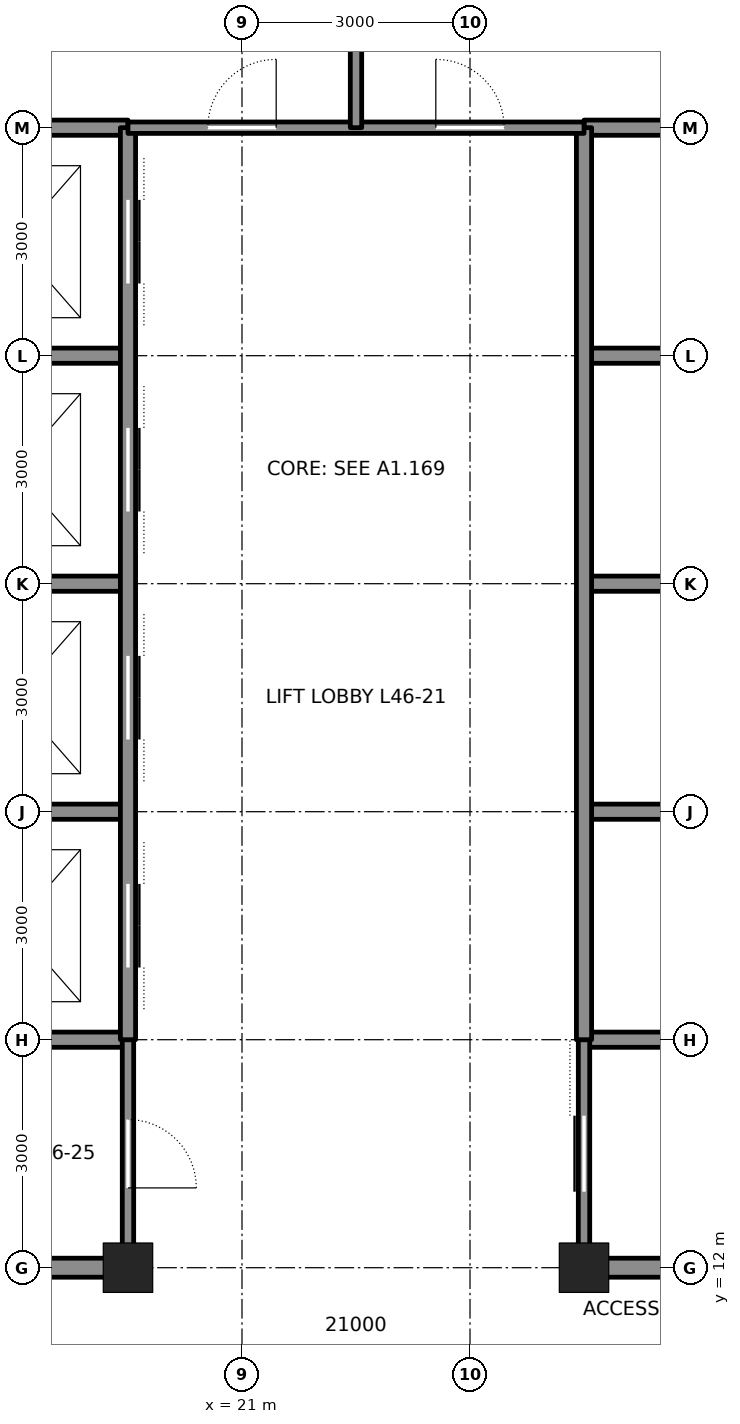
"""IFC4 building model, lengths in metres.
Left out: names, types, materials, properties, quantities, classifications, styles, units other than length and angle.
Written with IfcOpenShell. Run it as: python <this file> out.ifc"""

import sys

from ifc_helpers import new_model, si_unit, direction, frame, frame_2d, origin, origin_2d, place, context, subcontext, project, spatial, rectangle, hollow_rectangle, extrude, element, fill, save


model = new_model("IFC4")
c1 = context("Model", 3, precision=1e-05, world=origin(), true_north=direction((0.0, 1.0)))
c2 = subcontext(c1, "Body", "Model", "MODEL_VIEW")
j1 = project(units=[si_unit("LENGTHUNIT", "METRE"), si_unit("PLANEANGLEUNIT", "RADIAN")], contexts=[c1])
p1 = place(None, origin())
s1 = spatial("IfcSite", under=j1, at=p1, CompositionType="ELEMENT")
p2 = place(p1, origin())
s2 = spatial("IfcBuilding", under=s1, at=p2, CompositionType="ELEMENT")
p3 = place(p2, frame((0.0, 0.0, 209.7)))
s3 = spatial("IfcBuildingStorey", under=s2, at=p3, CompositionType="ELEMENT", Elevation=209.7)
for number, where, z_axis, x_axis in (
    (1, (19.5, 12.0, 0.0), (0.0, 0.0, 1.0), (1.0, 0.0, 0.0)),
    (2, (25.5, 12.0, 0.0), (0.0, 0.0, 1.0), (1.0, 0.0, 0.0)),
):
    element("IfcColumn", number, at=place(p3, frame(where, z_axis=z_axis, x_axis=x_axis)), inside=s3, PredefinedType="COLUMN", context=c2, shape_type="SweptSolid", body=[
        extrude(hollow_rectangle(XDim=0.65, YDim=0.65, WallThickness=0.065, at=origin_2d()), origin(), (0.0, 0.0, 1.0), 4.2),
    ])
for number, where, z_axis, x_axis in (
    (3, (16.75, 12.0, 0.0), (0.0, 0.0, 1.0), (1.0, 0.0, 0.0)),
    (4, (25.75, 12.0, 0.0), (0.0, 0.0, 1.0), (1.0, 0.0, 0.0)),
):
    element("IfcWall", number, at=place(p3, frame(where, z_axis=z_axis, x_axis=x_axis)), inside=s3, PredefinedType="SOLIDWALL", context=c2, shape_type="SweptSolid", body=[
        extrude(rectangle(XDim=2.5, YDim=0.25, at=frame_2d((1.25, 0.0))), origin(), (0.0, 0.0, 1.0), 3.182),
    ])
for number, where, z_axis, x_axis in (
    (5, (12.0, 15.0, 0.0), (0.0, 0.0, 1.0), (1.0, 0.0, 0.0)),
    (6, (25.5, 15.0, 0.0), (0.0, 0.0, 1.0), (1.0, 0.0, 0.0)),
):
    element("IfcWall", number, at=place(p3, frame(where, z_axis=z_axis, x_axis=x_axis)), inside=s3, PredefinedType="SOLIDWALL", context=c2, shape_type="SweptSolid", body=[
        extrude(rectangle(XDim=7.5, YDim=0.2, at=frame_2d((3.75, 0.0))), origin(), (0.0, 0.0, 1.0), 4.04),
    ])
for number, where, z_axis, x_axis in (
    (7, (16.75, 24.0, 0.0), (0.0, 0.0, 1.0), (1.0, 0.0, 0.0)),
    (8, (25.5, 24.0, 0.0), (0.0, 0.0, 1.0), (1.0, 0.0, 0.0)),
):
    element("IfcWall", number, at=place(p3, frame(where, z_axis=z_axis, x_axis=x_axis)), inside=s3, PredefinedType="SOLIDWALL", context=c2, shape_type="SweptSolid", body=[
        extrude(rectangle(XDim=2.75, YDim=0.2, at=frame_2d((1.375, 0.0))), origin(), (0.0, 0.0, 1.0), 3.09),
    ])
p4 = place(p3, frame((12.0, 27.0, 0.0), z_axis=(0.0, 0.0, 1.0), x_axis=(1.0, 0.0, 0.0)))
e9 = element("IfcWall", 9, at=p4, inside=s3, PredefinedType="SOLIDWALL", context=c2, shape_type="SweptSolid", body=[
    extrude(rectangle(XDim=7.5, YDim=0.2, at=frame_2d((3.75, 0.0))), origin(), (0.0, 0.0, 1.0), 4.04),
])
p5 = place(p4, frame((1.65, 0.0, 0.0)))
e10 = element("IfcOpeningElement", 10, at=p5, cuts=e9, PredefinedType="OPENING", context=c2, shape_type="SweptSolid", body=[
    extrude(rectangle(XDim=1.2, YDim=2.1, at=frame_2d((0.6, 1.05))), frame((0.0, 0.11, 0.0), z_axis=(0.0, -1.0, 0.0), x_axis=(1.0, 0.0, 0.0)), (0.0, 0.0, 1.0), 0.22),
])
for number, where, z_axis, x_axis in (
    (11, (25.5, 27.0, 0.0), (0.0, 0.0, 1.0), (1.0, 0.0, 0.0)),
    (12, (16.5, 18.0, 0.0), (0.0, 0.0, 1.0), (1.0, 0.0, 0.0)),
):
    element("IfcWall", number, at=place(p3, frame(where, z_axis=z_axis, x_axis=x_axis)), inside=s3, PredefinedType="SOLIDWALL", context=c2, shape_type="SweptSolid", body=[
        extrude(rectangle(XDim=3.0, YDim=0.2, at=frame_2d((1.5, 0.0))), origin(), (0.0, 0.0, 1.0), 4.04),
    ])
p6 = place(p3, frame((25.5, 18.0, 0.0), z_axis=(0.0, 0.0, 1.0), x_axis=(1.0, 0.0, 0.0)))
e13 = element("IfcWall", 13, at=p6, inside=s3, PredefinedType="SOLIDWALL", context=c2, shape_type="SweptSolid", body=[
    extrude(rectangle(XDim=7.5, YDim=0.2, at=frame_2d((3.75, 0.0))), origin(), (0.0, 0.0, 1.0), 4.04),
])
p7 = place(p6, frame((4.65, 0.0, 0.0)))
e14 = element("IfcOpeningElement", 14, at=p7, cuts=e13, PredefinedType="OPENING", context=c2, shape_type="SweptSolid", body=[
    extrude(rectangle(XDim=1.2, YDim=2.1, at=frame_2d((0.6, 1.05))), frame((0.0, 0.11, 0.0), z_axis=(0.0, -1.0, 0.0), x_axis=(1.0, 0.0, 0.0)), (0.0, 0.0, 1.0), 0.22),
])
for number, where, z_axis, x_axis in (
    (15, (16.75, 21.0, 0.0), (0.0, 0.0, 1.0), (1.0, 0.0, 0.0)),
    (16, (25.5, 21.0, 0.0), (0.0, 0.0, 1.0), (1.0, 0.0, 0.0)),
):
    element("IfcWall", number, at=place(p3, frame(where, z_axis=z_axis, x_axis=x_axis)), inside=s3, PredefinedType="SOLIDWALL", context=c2, shape_type="SweptSolid", body=[
        extrude(rectangle(XDim=2.75, YDim=0.2, at=frame_2d((1.375, 0.0))), origin(), (0.0, 0.0, 1.0), 3.09),
    ])
p8 = place(p3, frame((19.5, 12.25, 0.0), z_axis=(0.0, 0.0, 1.0), x_axis=(0.0, 1.0, 0.0)))
e17 = element("IfcWall", 17, at=p8, inside=s3, PredefinedType="PARTITIONING", context=c2, shape_type="SweptSolid", body=[
    extrude(rectangle(XDim=2.75, YDim=0.15, at=frame_2d((1.375, 0.0))), origin(), (0.0, 0.0, 1.0), 3.065),
])
p9 = place(p8, frame((0.8, 0.0, 0.0)))
e18 = element("IfcOpeningElement", 18, at=p9, cuts=e17, PredefinedType="OPENING", context=c2, shape_type="SweptSolid", body=[
    extrude(rectangle(XDim=0.9, YDim=2.1, at=frame_2d((0.45, 1.05))), frame((0.0, 0.085, 0.0), z_axis=(0.0, -1.0, 0.0), x_axis=(1.0, 0.0, 0.0)), (0.0, 0.0, 1.0), 0.17),
])
p10 = place(p3, frame((19.5, 15.0, 0.0), z_axis=(0.0, 0.0, 1.0), x_axis=(0.0, 1.0, 0.0)))
e19 = element("IfcWall", 19, at=p10, inside=s3, PredefinedType="SOLIDWALL", context=c2, shape_type="SweptSolid", body=[
    extrude(rectangle(XDim=12.0, YDim=0.2, at=frame_2d((6.0, 0.0))), origin(), (0.0, 0.0, 1.0), 3.065),
])
p11 = place(p10, frame((0.95, 0.0, 0.0)))
e20 = element("IfcOpeningElement", 20, at=p11, cuts=e19, PredefinedType="OPENING", context=c2, shape_type="SweptSolid", body=[
    extrude(rectangle(XDim=1.1, YDim=2.1, at=frame_2d((0.55, 1.05))), frame((0.0, 0.11, 0.0), z_axis=(0.0, -1.0, 0.0), x_axis=(1.0, 0.0, 0.0)), (0.0, 0.0, 1.0), 0.22),
])
p12 = place(p10, frame((3.95, 0.0, 0.0)))
e21 = element("IfcOpeningElement", 21, at=p12, cuts=e19, PredefinedType="OPENING", context=c2, shape_type="SweptSolid", body=[
    extrude(rectangle(XDim=1.1, YDim=2.1, at=frame_2d((0.55, 1.05))), frame((0.0, 0.11, 0.0), z_axis=(0.0, -1.0, 0.0), x_axis=(1.0, 0.0, 0.0)), (0.0, 0.0, 1.0), 0.22),
])
p13 = place(p10, frame((6.95, 0.0, 0.0)))
e22 = element("IfcOpeningElement", 22, at=p13, cuts=e19, PredefinedType="OPENING", context=c2, shape_type="SweptSolid", body=[
    extrude(rectangle(XDim=1.1, YDim=2.1, at=frame_2d((0.55, 1.05))), frame((0.0, 0.11, 0.0), z_axis=(0.0, -1.0, 0.0), x_axis=(1.0, 0.0, 0.0)), (0.0, 0.0, 1.0), 0.22),
])
p14 = place(p10, frame((9.95, 0.0, 0.0)))
e23 = element("IfcOpeningElement", 23, at=p14, cuts=e19, PredefinedType="OPENING", context=c2, shape_type="SweptSolid", body=[
    extrude(rectangle(XDim=1.1, YDim=2.1, at=frame_2d((0.55, 1.05))), frame((0.0, 0.11, 0.0), z_axis=(0.0, -1.0, 0.0), x_axis=(1.0, 0.0, 0.0)), (0.0, 0.0, 1.0), 0.22),
])
p15 = place(p3, frame((25.5, 12.25, 0.0), z_axis=(0.0, 0.0, 1.0), x_axis=(0.0, 1.0, 0.0)))
e24 = element("IfcWall", 24, at=p15, inside=s3, PredefinedType="PARTITIONING", context=c2, shape_type="SweptSolid", body=[
    extrude(rectangle(XDim=2.75, YDim=0.15, at=frame_2d((1.375, 0.0))), origin(), (0.0, 0.0, 1.0), 3.065),
])
p16 = place(p15, frame((0.75, 0.0, 0.0)))
e25 = element("IfcOpeningElement", 25, at=p16, cuts=e24, PredefinedType="OPENING", context=c2, shape_type="SweptSolid", body=[
    extrude(rectangle(XDim=1.0, YDim=2.1, at=frame_2d((0.5, 1.05))), frame((0.0, 0.085, 0.0), z_axis=(0.0, -1.0, 0.0), x_axis=(1.0, 0.0, 0.0)), (0.0, 0.0, 1.0), 0.17),
])
p17 = place(p3, frame((25.5, 15.0, 0.0), z_axis=(0.0, 0.0, 1.0), x_axis=(0.0, 1.0, 0.0)))
e26 = element("IfcWall", 26, at=p17, inside=s3, PredefinedType="SOLIDWALL", context=c2, shape_type="SweptSolid", body=[
    extrude(rectangle(XDim=12.0, YDim=0.2, at=frame_2d((6.0, 0.0))), origin(), (0.0, 0.0, 1.0), 3.065),
])
p18 = place(p3, frame((19.5, 27.0, 0.0), z_axis=(0.0, 0.0, 1.0), x_axis=(1.0, 0.0, 0.0)))
e27 = element("IfcWall", 27, at=p18, inside=s3, PredefinedType="PARTITIONING", context=c2, shape_type="SweptSolid", body=[
    extrude(rectangle(XDim=6.0, YDim=0.15, at=frame_2d((3.0, 0.0))), origin(), (0.0, 0.0, 1.0), 4.04),
])
p19 = place(p18, frame((1.05, 0.0, 0.0)))
e28 = element("IfcOpeningElement", 28, at=p19, cuts=e27, PredefinedType="OPENING", context=c2, shape_type="SweptSolid", body=[
    extrude(rectangle(XDim=0.9, YDim=2.1, at=frame_2d((0.45, 1.05))), frame((0.0, 0.085, 0.0), z_axis=(0.0, -1.0, 0.0), x_axis=(1.0, 0.0, 0.0)), (0.0, 0.0, 1.0), 0.17),
])
p20 = place(p18, frame((4.05, 0.0, 0.0)))
e29 = element("IfcOpeningElement", 29, at=p20, cuts=e27, PredefinedType="OPENING", context=c2, shape_type="SweptSolid", body=[
    extrude(rectangle(XDim=0.9, YDim=2.1, at=frame_2d((0.45, 1.05))), frame((0.0, 0.085, 0.0), z_axis=(0.0, -1.0, 0.0), x_axis=(1.0, 0.0, 0.0)), (0.0, 0.0, 1.0), 0.17),
])
p21 = place(p3, frame((22.5, 27.0, 0.0), z_axis=(0.0, 0.0, 1.0), x_axis=(0.0, 1.0, 0.0)))
e30 = element("IfcWall", 30, at=p21, inside=s3, PredefinedType="PARTITIONING", context=c2, shape_type="SweptSolid", body=[
    extrude(rectangle(XDim=6.0, YDim=0.15, at=frame_2d((3.0, 0.0))), origin(), (0.0, 0.0, 1.0), 4.04),
])
p22 = place(p19, origin())
e31 = element("IfcDoor", 31, at=p22, inside=s3, OperationType="SINGLE_SWING_RIGHT", PredefinedType="DOOR", context=c2, shape_type="SweptSolid", body=[
    extrude(rectangle(XDim=0.9, YDim=2.1, at=frame_2d((0.45, 1.05))), frame((0.0, 0.025, 0.0), z_axis=(0.0, -1.0, 0.0), x_axis=(1.0, 0.0, 0.0)), (0.0, 0.0, 1.0), 0.05),
])
fill(e28, e31)
p23 = place(p20, origin())
e32 = element("IfcDoor", 32, at=p23, inside=s3, OperationType="SINGLE_SWING_LEFT", PredefinedType="DOOR", context=c2, shape_type="SweptSolid", body=[
    extrude(rectangle(XDim=0.9, YDim=2.1, at=frame_2d((0.45, 1.05))), frame((0.0, 0.025, 0.0), z_axis=(0.0, -1.0, 0.0), x_axis=(1.0, 0.0, 0.0)), (0.0, 0.0, 1.0), 0.05),
])
fill(e29, e32)
p24 = place(p16, origin())
e33 = element("IfcDoor", 33, at=p24, inside=s3, OperationType="SLIDING_TO_LEFT", PredefinedType="DOOR", context=c2, shape_type="SweptSolid", body=[
    extrude(rectangle(XDim=1.0, YDim=2.1, at=frame_2d((0.5, 1.05))), frame((0.0, 0.025, 0.0), z_axis=(0.0, -1.0, 0.0), x_axis=(1.0, 0.0, 0.0)), (0.0, 0.0, 1.0), 0.05),
])
fill(e25, e33)
p25 = place(p9, frame((0.9, 0.0, 0.0), z_axis=(0.0, 0.0, 1.0), x_axis=(-1.0, 0.0, 0.0)))
e34 = element("IfcDoor", 34, at=p25, inside=s3, OperationType="SINGLE_SWING_RIGHT", PredefinedType="DOOR", context=c2, shape_type="SweptSolid", body=[
    extrude(rectangle(XDim=0.9, YDim=2.1, at=frame_2d((0.45, 1.05))), frame((0.0, 0.025, 0.0), z_axis=(0.0, -1.0, 0.0), x_axis=(1.0, 0.0, 0.0)), (0.0, 0.0, 1.0), 0.05),
])
fill(e18, e34)
p26 = place(p11, origin())
e35 = element("IfcDoor", 35, at=p26, inside=s3, OperationType="DOUBLE_DOOR_SLIDING", PredefinedType="DOOR", context=c2, shape_type="SweptSolid", body=[
    extrude(rectangle(XDim=1.1, YDim=2.1, at=frame_2d((0.55, 1.05))), frame((0.0, 0.025, 0.0), z_axis=(0.0, -1.0, 0.0), x_axis=(1.0, 0.0, 0.0)), (0.0, 0.0, 1.0), 0.05),
])
fill(e20, e35)
p27 = place(p12, origin())
e36 = element("IfcDoor", 36, at=p27, inside=s3, OperationType="DOUBLE_DOOR_SLIDING", PredefinedType="DOOR", context=c2, shape_type="SweptSolid", body=[
    extrude(rectangle(XDim=1.1, YDim=2.1, at=frame_2d((0.55, 1.05))), frame((0.0, 0.025, 0.0), z_axis=(0.0, -1.0, 0.0), x_axis=(1.0, 0.0, 0.0)), (0.0, 0.0, 1.0), 0.05),
])
fill(e21, e36)
p28 = place(p13, origin())
e37 = element("IfcDoor", 37, at=p28, inside=s3, OperationType="DOUBLE_DOOR_SLIDING", PredefinedType="DOOR", context=c2, shape_type="SweptSolid", body=[
    extrude(rectangle(XDim=1.1, YDim=2.1, at=frame_2d((0.55, 1.05))), frame((0.0, 0.025, 0.0), z_axis=(0.0, -1.0, 0.0), x_axis=(1.0, 0.0, 0.0)), (0.0, 0.0, 1.0), 0.05),
])
fill(e22, e37)
p29 = place(p14, origin())
e38 = element("IfcDoor", 38, at=p29, inside=s3, OperationType="DOUBLE_DOOR_SLIDING", PredefinedType="DOOR", context=c2, shape_type="SweptSolid", body=[
    extrude(rectangle(XDim=1.1, YDim=2.1, at=frame_2d((0.55, 1.05))), frame((0.0, 0.025, 0.0), z_axis=(0.0, -1.0, 0.0), x_axis=(1.0, 0.0, 0.0)), (0.0, 0.0, 1.0), 0.05),
])
fill(e23, e38)
save(model, sys.argv[1])
